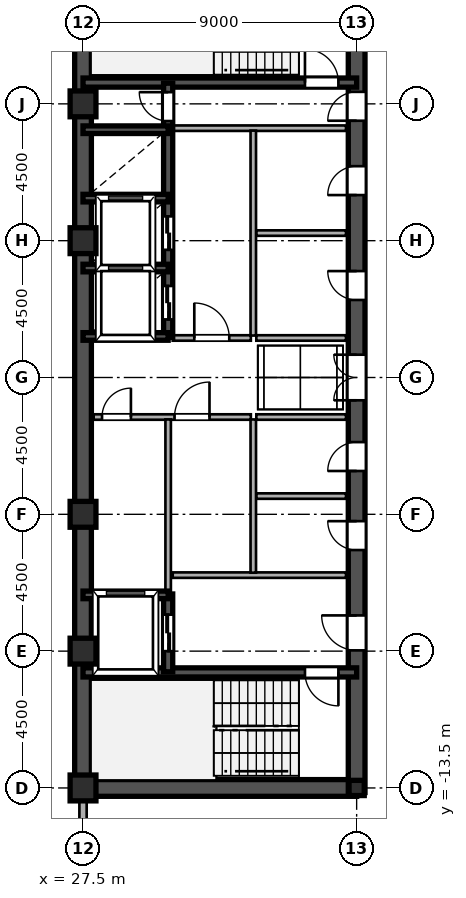
"""IFC4 building model, lengths in metres.
Left out: names, types, materials, properties, quantities, classifications, styles, units other than length and angle.
Written with IfcOpenShell. Run it as: python <this file> out.ifc"""

import sys

from ifc_helpers import new_model, si_unit, direction, frame, frame_2d, origin, origin_2d, place, context, subcontext, project, spatial, rectangle, hollow_rectangle, i_section, extrude, source, transform, mapped, element, fill, save


model = new_model("IFC4")
c1 = context("Model", 3, precision=1e-05, world=origin(), true_north=direction((0.0, 1.0)))
c2 = subcontext(c1, "Body", "Model", "MODEL_VIEW")
j1 = project(units=[si_unit("LENGTHUNIT", "METRE"), si_unit("PLANEANGLEUNIT", "RADIAN")], contexts=[c1])
p1 = place(None, origin())
s1 = spatial("IfcSite", under=j1, at=p1, CompositionType="ELEMENT")
p2 = place(p1, origin())
s2 = spatial("IfcBuilding", under=s1, at=p2, CompositionType="ELEMENT")
p3 = place(p2, frame((0.0, 0.0, 206.7)))
s3 = spatial("IfcBuildingStorey", under=s2, at=p3, CompositionType="ELEMENT", Elevation=206.7)
m1 = source(origin(), c2, "Body", "SweptSolid", [
    extrude(hollow_rectangle(XDim=0.85, YDim=0.85, WallThickness=0.036, at=origin_2d()), origin(), (0.0, 0.0, 1.0), 3.6),
])
for number, where, z_axis, x_axis in (
    (1, (27.5, -13.5, 0.0), (0.0, 0.0, 1.0), (1.0, 0.0, 0.0)),
    (2, (27.5, -9.0, 0.0), (0.0, 0.0, 1.0), (1.0, 0.0, 0.0)),
    (3, (27.5, -4.5, 0.0), (0.0, 0.0, 1.0), (1.0, 0.0, 0.0)),
    (4, (27.5, 4.5, 0.0), (0.0, 0.0, 1.0), (1.0, 0.0, 0.0)),
    (5, (27.5, 9.0, 0.0), (0.0, 0.0, 1.0), (1.0, 0.0, 0.0)),
):
    element("IfcColumn", number, at=place(p3, frame(where, z_axis=z_axis, x_axis=x_axis)), inside=s3, PredefinedType="COLUMN", context=c2, shape_type="MappedRepresentation", body=[
        mapped(m1, transform((0.0, 0.0, 0.0), scale=1.0)),
    ])
m2 = source(origin(), c2, "Body", "SweptSolid", [
    extrude(i_section(OverallWidth=0.5, OverallDepth=0.5, WebThickness=0.02, FlangeThickness=0.032, at=origin_2d()), origin(), (0.0, 0.0, 1.0), 3.6),
])
p4 = place(p3, frame((36.5, -13.5, 0.0), z_axis=(0.0, 0.0, 1.0), x_axis=(1.0, 0.0, 0.0)))
e6 = element("IfcColumn", 6, at=p4, inside=s3, PredefinedType="COLUMN", context=c2, shape_type="MappedRepresentation", body=[
    mapped(m2, transform((0.0, 0.0, 0.0), scale=1.0)),
])
p5 = place(p3, frame((27.5, -15.98, 0.0), z_axis=(0.0, 0.0, 1.0), x_axis=(0.0, 1.0, 0.0)))
e7 = element("IfcWall", 7, at=p5, inside=s3, PredefinedType="SOLIDWALL", context=c2, shape_type="SweptSolid", body=[
    extrude(rectangle(XDim=1.6, YDim=0.24, at=frame_2d((0.8, 0.0))), origin(), (0.0, 0.0, 1.0), 3.38),
])
p6 = place(p3, frame((27.5, -14.38, 0.0), z_axis=(0.0, 0.0, 1.0), x_axis=(0.0, 1.0, 0.0)))
e8 = element("IfcWall", 8, at=p6, inside=s3, PredefinedType="SOLIDWALL", context=c2, shape_type="SweptSolid", body=[
    extrude(rectangle(XDim=0.6, YDim=0.24, at=frame_2d((0.3, 0.0))), origin(), (0.0, 0.0, 1.0), 2.88),
])
for number, where, z_axis, x_axis in (
    (9, (27.5, -13.5, 0.0), (0.0, 0.0, 1.0), (0.0, 1.0, 0.0)),
    (10, (27.5, 1.3, 0.0), (0.0, 0.0, 1.0), (0.0, 1.0, 0.0)),
):
    element("IfcWall", number, at=place(p3, frame(where, z_axis=z_axis, x_axis=x_axis)), inside=s3, PredefinedType="SHEAR", context=c2, shape_type="SweptSolid", body=[
        extrude(rectangle(XDim=12.2, YDim=0.55, at=frame_2d((6.1, 0.0))), origin(), (0.0, 0.0, 1.0), 3.38),
    ])
p7 = place(p3, frame((27.5, -1.3, 0.0), z_axis=(0.0, 0.0, 1.0), x_axis=(0.0, 1.0, 0.0)))
e11 = element("IfcWall", 11, at=p7, inside=s3, PredefinedType="SHEAR", context=c2, shape_type="SweptSolid", body=[
    extrude(rectangle(XDim=2.6, YDim=0.55, at=frame_2d((1.3, 0.0))), origin(), (0.0, 0.0, 1.0), 3.38),
])
p8 = place(p3, frame((27.5, -13.5, 0.0), z_axis=(0.0, 0.0, 1.0), x_axis=(1.0, 0.0, 0.0)))
e12 = element("IfcWall", 12, at=p8, inside=s3, PredefinedType="SHEAR", context=c2, shape_type="SweptSolid", body=[
    extrude(rectangle(XDim=9.0, YDim=0.55, at=frame_2d((4.5, 0.0))), origin(), (0.0, 0.0, 1.0), 3.38),
])
p9 = place(p3, frame((36.5, -13.65, 0.0), z_axis=(0.0, 0.0, 1.0), x_axis=(0.0, 1.0, 0.0)))
e13 = element("IfcWall", 13, at=p9, inside=s3, PredefinedType="SHEAR", context=c2, shape_type="SweptSolid", body=[
    extrude(rectangle(XDim=7.15, YDim=0.55, at=frame_2d((3.575, 0.0))), origin(), (0.0, 0.0, 1.0), 3.38),
])
p10 = place(p9, frame((4.675, 0.0, 0.0)))
e14 = element("IfcOpeningElement", 14, at=p10, cuts=e13, PredefinedType="OPENING", context=c2, shape_type="SweptSolid", body=[
    extrude(rectangle(XDim=1.15, YDim=2.2, at=frame_2d((0.575, 1.1))), frame((0.0, 0.285, 0.0), z_axis=(0.0, -1.0, 0.0), x_axis=(1.0, 0.0, 0.0)), (0.0, 0.0, 1.0), 0.57),
])
p11 = place(p3, frame((36.5, -1.3, 0.0), z_axis=(0.0, 0.0, 1.0), x_axis=(0.0, 1.0, 0.0)))
e15 = element("IfcWall", 15, at=p11, inside=s3, PredefinedType="SHEAR", context=c2, shape_type="SweptSolid", body=[
    extrude(rectangle(XDim=2.6, YDim=0.55, at=frame_2d((1.3, 0.0))), origin(), (0.0, 0.0, 1.0), 3.38),
])
p12 = place(p11, frame((0.55, 0.0, 0.0)))
e16 = element("IfcOpeningElement", 16, at=p12, cuts=e15, PredefinedType="OPENING", context=c2, shape_type="SweptSolid", body=[
    extrude(rectangle(XDim=1.5, YDim=2.3, at=frame_2d((0.75, 1.15))), frame((0.0, 0.285, 0.0), z_axis=(0.0, -1.0, 0.0), x_axis=(1.0, 0.0, 0.0)), (0.0, 0.0, 1.0), 0.57),
])
p13 = place(p3, frame((36.5, 8.2, 0.0), z_axis=(0.0, 0.0, 1.0), x_axis=(0.0, 1.0, 0.0)))
e17 = element("IfcWall", 17, at=p13, inside=s3, PredefinedType="SHEAR", context=c2, shape_type="SweptSolid", body=[
    extrude(rectangle(XDim=5.45, YDim=0.55, at=frame_2d((2.725, 0.0))), origin(), (0.0, 0.0, 1.0), 3.38),
])
p14 = place(p13, frame((0.245, 0.0, 0.0)))
e18 = element("IfcOpeningElement", 18, at=p14, cuts=e17, PredefinedType="OPENING", context=c2, shape_type="SweptSolid", body=[
    extrude(rectangle(XDim=0.95, YDim=2.15, at=frame_2d((0.475, 1.075))), frame((0.0, 0.285, 0.0), z_axis=(0.0, -1.0, 0.0), x_axis=(1.0, 0.0, 0.0)), (0.0, 0.0, 1.0), 0.57),
])
p15 = place(p3, frame((36.5, -6.5, 0.0), z_axis=(0.0, 0.0, 1.0), x_axis=(0.0, 1.0, 0.0)))
e19 = element("IfcWall", 19, at=p15, inside=s3, PredefinedType="SHEAR", context=c2, shape_type="SweptSolid", body=[
    extrude(rectangle(XDim=2.6, YDim=0.55, at=frame_2d((1.3, 0.0))), origin(), (0.0, 0.0, 1.0), 3.38),
])
p16 = place(p15, frame((0.825, 0.0, 0.0)))
e20 = element("IfcOpeningElement", 20, at=p16, cuts=e19, PredefinedType="OPENING", context=c2, shape_type="SweptSolid", body=[
    extrude(rectangle(XDim=0.95, YDim=2.15, at=frame_2d((0.475, 1.075))), frame((0.0, 0.285, 0.0), z_axis=(0.0, -1.0, 0.0), x_axis=(1.0, 0.0, 0.0)), (0.0, 0.0, 1.0), 0.57),
])
p17 = place(p3, frame((36.5, -3.9, 0.0), z_axis=(0.0, 0.0, 1.0), x_axis=(0.0, 1.0, 0.0)))
e21 = element("IfcWall", 21, at=p17, inside=s3, PredefinedType="SHEAR", context=c2, shape_type="SweptSolid", body=[
    extrude(rectangle(XDim=2.6, YDim=0.55, at=frame_2d((1.3, 0.0))), origin(), (0.0, 0.0, 1.0), 3.38),
])
p18 = place(p17, frame((0.825, 0.0, 0.0)))
e22 = element("IfcOpeningElement", 22, at=p18, cuts=e21, PredefinedType="OPENING", context=c2, shape_type="SweptSolid", body=[
    extrude(rectangle(XDim=0.95, YDim=2.15, at=frame_2d((0.475, 1.075))), frame((0.0, 0.285, 0.0), z_axis=(0.0, -1.0, 0.0), x_axis=(1.0, 0.0, 0.0)), (0.0, 0.0, 1.0), 0.57),
])
p19 = place(p3, frame((36.5, 1.3, 0.0), z_axis=(0.0, 0.0, 1.0), x_axis=(0.0, 1.0, 0.0)))
e23 = element("IfcWall", 23, at=p19, inside=s3, PredefinedType="SHEAR", context=c2, shape_type="SweptSolid", body=[
    extrude(rectangle(XDim=3.45, YDim=0.55, at=frame_2d((1.725, 0.0))), origin(), (0.0, 0.0, 1.0), 3.38),
])
p20 = place(p19, frame((1.25, 0.0, 0.0)))
e24 = element("IfcOpeningElement", 24, at=p20, cuts=e23, PredefinedType="OPENING", context=c2, shape_type="SweptSolid", body=[
    extrude(rectangle(XDim=0.95, YDim=2.15, at=frame_2d((0.475, 1.075))), frame((0.0, 0.285, 0.0), z_axis=(0.0, -1.0, 0.0), x_axis=(1.0, 0.0, 0.0)), (0.0, 0.0, 1.0), 0.57),
])
p21 = place(p3, frame((36.5, 4.75, 0.0), z_axis=(0.0, 0.0, 1.0), x_axis=(0.0, 1.0, 0.0)))
e25 = element("IfcWall", 25, at=p21, inside=s3, PredefinedType="SHEAR", context=c2, shape_type="SweptSolid", body=[
    extrude(rectangle(XDim=3.45, YDim=0.55, at=frame_2d((1.725, 0.0))), origin(), (0.0, 0.0, 1.0), 3.38),
])
p22 = place(p21, frame((1.25, 0.0, 0.0)))
e26 = element("IfcOpeningElement", 26, at=p22, cuts=e25, PredefinedType="OPENING", context=c2, shape_type="SweptSolid", body=[
    extrude(rectangle(XDim=0.95, YDim=2.15, at=frame_2d((0.475, 1.075))), frame((0.0, 0.285, 0.0), z_axis=(0.0, -1.0, 0.0), x_axis=(1.0, 0.0, 0.0)), (0.0, 0.0, 1.0), 0.57),
])
p23 = place(p3, frame((27.5, -9.7, 0.0), z_axis=(0.0, 0.0, 1.0), x_axis=(1.0, 0.0, 0.0)))
e27 = element("IfcWall", 27, at=p23, inside=s3, PredefinedType="SHEAR", context=c2, shape_type="SweptSolid", body=[
    extrude(rectangle(XDim=9.0, YDim=0.3, at=frame_2d((4.5, 0.0))), origin(), (0.0, 0.0, 1.0), 3.38),
])
p24 = place(p23, frame((7.3, 0.0, 0.0)))
e28 = element("IfcOpeningElement", 28, at=p24, cuts=e27, PredefinedType="OPENING", context=c2, shape_type="SweptSolid", body=[
    extrude(rectangle(XDim=1.1, YDim=2.2, at=frame_2d((0.55, 1.1))), frame((0.0, 0.16, 0.0), z_axis=(0.0, -1.0, 0.0), x_axis=(1.0, 0.0, 0.0)), (0.0, 0.0, 1.0), 0.32),
])
p25 = place(p3, frame((27.5, 9.7, 0.0), z_axis=(0.0, 0.0, 1.0), x_axis=(1.0, 0.0, 0.0)))
e29 = element("IfcWall", 29, at=p25, inside=s3, PredefinedType="SHEAR", context=c2, shape_type="SweptSolid", body=[
    extrude(rectangle(XDim=9.0, YDim=0.3, at=frame_2d((4.5, 0.0))), origin(), (0.0, 0.0, 1.0), 3.38),
])
p26 = place(p25, frame((7.3, 0.0, 0.0)))
e30 = element("IfcOpeningElement", 30, at=p26, cuts=e29, PredefinedType="OPENING", context=c2, shape_type="SweptSolid", body=[
    extrude(rectangle(XDim=1.1, YDim=2.2, at=frame_2d((0.55, 1.1))), frame((0.0, 0.16, 0.0), z_axis=(0.0, -1.0, 0.0), x_axis=(1.0, 0.0, 0.0)), (0.0, 0.0, 1.0), 0.32),
])
for number, where, z_axis, x_axis in (
    (31, (27.5, -7.15, 0.0), (0.0, 0.0, 1.0), (1.0, 0.0, 0.0)),
    (32, (27.5, 1.35, 0.0), (0.0, 0.0, 1.0), (1.0, 0.0, 0.0)),
    (33, (27.5, 3.6, 0.0), (0.0, 0.0, 1.0), (1.0, 0.0, 0.0)),
    (34, (27.5, 5.9, 0.0), (0.0, 0.0, 1.0), (1.0, 0.0, 0.0)),
    (35, (27.5, 8.15, 0.0), (0.0, 0.0, 1.0), (1.0, 0.0, 0.0)),
):
    element("IfcWall", number, at=place(p3, frame(where, z_axis=z_axis, x_axis=x_axis)), inside=s3, PredefinedType="SHEAR", context=c2, shape_type="SweptSolid", body=[
        extrude(rectangle(XDim=2.8, YDim=0.25, at=frame_2d((1.4, 0.0))), origin(), (0.0, 0.0, 1.0), 3.38),
    ])
p27 = place(p3, frame((30.3, -9.68, 0.0), z_axis=(0.0, 0.0, 1.0), x_axis=(0.0, 1.0, 0.0)))
e36 = element("IfcWall", 36, at=p27, inside=s3, PredefinedType="SHEAR", context=c2, shape_type="SweptSolid", body=[
    extrude(rectangle(XDim=2.56, YDim=0.3, at=frame_2d((1.28, 0.0))), origin(), (0.0, 0.0, 1.0), 3.38),
])
p28 = place(p27, frame((0.68, 0.0, 0.0)))
e37 = element("IfcOpeningElement", 37, at=p28, cuts=e36, PredefinedType="OPENING", context=c2, shape_type="SweptSolid", body=[
    extrude(rectangle(XDim=1.2, YDim=2.25, at=frame_2d((0.6, 1.125))), frame((0.0, 0.16, 0.0), z_axis=(0.0, -1.0, 0.0), x_axis=(1.0, 0.0, 0.0)), (0.0, 0.0, 1.0), 0.32),
])
p29 = place(p3, frame((30.3, 1.32, 0.0), z_axis=(0.0, 0.0, 1.0), x_axis=(0.0, 1.0, 0.0)))
e38 = element("IfcWall", 38, at=p29, inside=s3, PredefinedType="SHEAR", context=c2, shape_type="SweptSolid", body=[
    extrude(rectangle(XDim=2.28, YDim=0.3, at=frame_2d((1.14, 0.0))), origin(), (0.0, 0.0, 1.0), 3.38),
])
p30 = place(p29, frame((0.59, 0.0, 0.0)))
e39 = element("IfcOpeningElement", 39, at=p30, cuts=e38, PredefinedType="OPENING", context=c2, shape_type="SweptSolid", body=[
    extrude(rectangle(XDim=1.1, YDim=2.2, at=frame_2d((0.55, 1.1))), frame((0.0, 0.16, 0.0), z_axis=(0.0, -1.0, 0.0), x_axis=(1.0, 0.0, 0.0)), (0.0, 0.0, 1.0), 0.32),
])
p31 = place(p3, frame((30.3, 3.6, 0.0), z_axis=(0.0, 0.0, 1.0), x_axis=(0.0, 1.0, 0.0)))
e40 = element("IfcWall", 40, at=p31, inside=s3, PredefinedType="SHEAR", context=c2, shape_type="SweptSolid", body=[
    extrude(rectangle(XDim=2.3, YDim=0.3, at=frame_2d((1.15, 0.0))), origin(), (0.0, 0.0, 1.0), 3.38),
])
p32 = place(p31, frame((0.6, 0.0, 0.0)))
e41 = element("IfcOpeningElement", 41, at=p32, cuts=e40, PredefinedType="OPENING", context=c2, shape_type="SweptSolid", body=[
    extrude(rectangle(XDim=1.1, YDim=2.2, at=frame_2d((0.55, 1.1))), frame((0.0, 0.16, 0.0), z_axis=(0.0, -1.0, 0.0), x_axis=(1.0, 0.0, 0.0)), (0.0, 0.0, 1.0), 0.32),
])
p33 = place(p3, frame((30.3, 5.9, 0.0), z_axis=(0.0, 0.0, 1.0), x_axis=(0.0, 1.0, 0.0)))
e42 = element("IfcWall", 42, at=p33, inside=s3, PredefinedType="SHEAR", context=c2, shape_type="SweptSolid", body=[
    extrude(rectangle(XDim=2.25, YDim=0.3, at=frame_2d((1.125, 0.0))), origin(), (0.0, 0.0, 1.0), 3.38),
])
p34 = place(p3, frame((30.3, 8.15, 0.0), z_axis=(0.0, 0.0, 1.0), x_axis=(0.0, 1.0, 0.0)))
e43 = element("IfcWall", 43, at=p34, inside=s3, PredefinedType="SHEAR", context=c2, shape_type="SweptSolid", body=[
    extrude(rectangle(XDim=1.53, YDim=0.3, at=frame_2d((0.765, 0.0))), origin(), (0.0, 0.0, 1.0), 3.38),
])
p35 = place(p34, frame((0.285, 0.0, 0.0)))
e44 = element("IfcOpeningElement", 44, at=p35, cuts=e43, PredefinedType="OPENING", context=c2, shape_type="SweptSolid", body=[
    extrude(rectangle(XDim=0.95, YDim=2.15, at=frame_2d((0.475, 1.075))), frame((0.0, 0.16, 0.0), z_axis=(0.0, -1.0, 0.0), x_axis=(1.0, 0.0, 0.0)), (0.0, 0.0, 1.0), 0.32),
])
for number, where, z_axis, x_axis in (
    (45, (30.45, -6.5, 0.0), (0.0, 0.0, 1.0), (1.0, 0.0, 0.0)),
    (46, (30.45, 8.2, 0.0), (0.0, 0.0, 1.0), (1.0, 0.0, 0.0)),
):
    element("IfcWall", number, at=place(p3, frame(where, z_axis=z_axis, x_axis=x_axis)), inside=s3, PredefinedType="PARTITIONING", context=c2, shape_type="SweptSolid", body=[
        extrude(rectangle(XDim=5.7, YDim=0.18, at=frame_2d((2.85, 0.0))), origin(), (0.0, 0.0, 1.0), 3.38),
    ])
p36 = place(p3, frame((33.1, -6.42, 0.0), z_axis=(0.0, 0.0, 1.0), x_axis=(0.0, 1.0, 0.0)))
e47 = element("IfcWall", 47, at=p36, inside=s3, PredefinedType="PARTITIONING", context=c2, shape_type="SweptSolid", body=[
    extrude(rectangle(XDim=5.04, YDim=0.18, at=frame_2d((2.52, 0.0))), origin(), (0.0, 0.0, 1.0), 3.38),
])
p37 = place(p3, frame((33.1, 1.38, 0.0), z_axis=(0.0, 0.0, 1.0), x_axis=(0.0, 1.0, 0.0)))
e48 = element("IfcWall", 48, at=p37, inside=s3, PredefinedType="PARTITIONING", context=c2, shape_type="SweptSolid", body=[
    extrude(rectangle(XDim=6.74, YDim=0.18, at=frame_2d((3.37, 0.0))), origin(), (0.0, 0.0, 1.0), 3.38),
])
p38 = place(p3, frame((27.85, -1.3, 0.0), z_axis=(0.0, 0.0, 1.0), x_axis=(1.0, 0.0, 0.0)))
e49 = element("IfcWall", 49, at=p38, inside=s3, PredefinedType="PARTITIONING", context=c2, shape_type="SweptSolid", body=[
    extrude(rectangle(XDim=2.45, YDim=0.18, at=frame_2d((1.225, 0.0))), origin(), (0.0, 0.0, 1.0), 3.38),
])
p39 = place(p38, frame((0.275, 0.0, 0.0)))
e50 = element("IfcOpeningElement", 50, at=p39, cuts=e49, PredefinedType="OPENING", context=c2, shape_type="SweptSolid", body=[
    extrude(rectangle(XDim=0.95, YDim=2.15, at=frame_2d((0.475, 1.075))), frame((0.0, 0.1, 0.0), z_axis=(0.0, -1.0, 0.0), x_axis=(1.0, 0.0, 0.0)), (0.0, 0.0, 1.0), 0.2),
])
p40 = place(p3, frame((30.3, -1.3, 0.0), z_axis=(0.0, 0.0, 1.0), x_axis=(1.0, 0.0, 0.0)))
e51 = element("IfcWall", 51, at=p40, inside=s3, PredefinedType="PARTITIONING", context=c2, shape_type="SweptSolid", body=[
    extrude(rectangle(XDim=2.72, YDim=0.18, at=frame_2d((1.36, 0.0))), origin(), (0.0, 0.0, 1.0), 3.38),
])
p41 = place(p40, frame((0.21, 0.0, 0.0)))
e52 = element("IfcOpeningElement", 52, at=p41, cuts=e51, PredefinedType="OPENING", context=c2, shape_type="SweptSolid", body=[
    extrude(rectangle(XDim=1.15, YDim=2.2, at=frame_2d((0.575, 1.1))), frame((0.0, 0.1, 0.0), z_axis=(0.0, -1.0, 0.0), x_axis=(1.0, 0.0, 0.0)), (0.0, 0.0, 1.0), 0.2),
])
p42 = place(p3, frame((30.3, -7.12, 0.0), z_axis=(0.0, 0.0, 1.0), x_axis=(0.0, 1.0, 0.0)))
e53 = element("IfcWall", 53, at=p42, inside=s3, PredefinedType="PARTITIONING", context=c2, shape_type="SweptSolid", body=[
    extrude(rectangle(XDim=5.74, YDim=0.18, at=frame_2d((2.87, 0.0))), origin(), (0.0, 0.0, 1.0), 3.38),
])
p43 = place(p3, frame((30.45, 1.3, 0.0), z_axis=(0.0, 0.0, 1.0), x_axis=(1.0, 0.0, 0.0)))
e54 = element("IfcWall", 54, at=p43, inside=s3, PredefinedType="PARTITIONING", context=c2, shape_type="SweptSolid", body=[
    extrude(rectangle(XDim=2.57, YDim=0.18, at=frame_2d((1.285, 0.0))), origin(), (0.0, 0.0, 1.0), 3.38),
])
p44 = place(p43, frame((0.71, 0.0, 0.0)))
e55 = element("IfcOpeningElement", 55, at=p44, cuts=e54, PredefinedType="OPENING", context=c2, shape_type="SweptSolid", body=[
    extrude(rectangle(XDim=1.15, YDim=2.2, at=frame_2d((0.575, 1.1))), frame((0.0, 0.1, 0.0), z_axis=(0.0, -1.0, 0.0), x_axis=(1.0, 0.0, 0.0)), (0.0, 0.0, 1.0), 0.2),
])
for number, where, z_axis, x_axis in (
    (56, (33.2, -1.3, 0.0), (0.0, 0.0, 1.0), (1.0, 0.0, 0.0)),
    (57, (33.2, 1.3, 0.0), (0.0, 0.0, 1.0), (1.0, 0.0, 0.0)),
    (58, (33.2, -3.9, 0.0), (0.0, 0.0, 1.0), (1.0, 0.0, 0.0)),
    (59, (33.2, 4.75, 0.0), (0.0, 0.0, 1.0), (1.0, 0.0, 0.0)),
):
    element("IfcWall", number, at=place(p3, frame(where, z_axis=z_axis, x_axis=x_axis)), inside=s3, PredefinedType="PARTITIONING", context=c2, shape_type="SweptSolid", body=[
        extrude(rectangle(XDim=2.95, YDim=0.18, at=frame_2d((1.475, 0.0))), origin(), (0.0, 0.0, 1.0), 3.38),
    ])
m3 = source(origin(), c2, "Body", "SweptSolid", [
    extrude(rectangle(XDim=1.15, YDim=2.2, at=frame_2d((0.575, 1.1))), frame((0.0, 0.025, 0.0), z_axis=(0.0, -1.0, 0.0), x_axis=(1.0, 0.0, 0.0)), (0.0, 0.0, 1.0), 0.05),
])
p45 = place(p10, origin())
e60 = element("IfcDoor", 60, at=p45, inside=s3, OperationType="SINGLE_SWING_RIGHT", PredefinedType="DOOR", context=c2, shape_type="MappedRepresentation", body=[
    mapped(m3, transform((0.0, 0.0, 0.0), scale=1.0)),
])
fill(e14, e60)
m4 = source(origin(), c2, "Body", "SweptSolid", [
    extrude(rectangle(XDim=1.5, YDim=2.3, at=frame_2d((0.75, 1.15))), frame((0.0, 0.025, 0.0), z_axis=(0.0, -1.0, 0.0), x_axis=(1.0, 0.0, 0.0)), (0.0, 0.0, 1.0), 0.05),
])
p46 = place(p12, origin())
e61 = element("IfcDoor", 61, at=p46, inside=s3, OperationType="DOUBLE_SWING_LEFT", PredefinedType="DOOR", context=c2, shape_type="MappedRepresentation", body=[
    mapped(m4, transform((0.0, 0.0, 0.0), scale=1.0)),
])
fill(e16, e61)
m5 = source(origin(), c2, "Body", "SweptSolid", [
    extrude(rectangle(XDim=0.95, YDim=2.15, at=frame_2d((0.475, 1.075))), frame((0.0, 0.025, 0.0), z_axis=(0.0, -1.0, 0.0), x_axis=(1.0, 0.0, 0.0)), (0.0, 0.0, 1.0), 0.05),
])
p47 = place(p14, origin())
e62 = element("IfcDoor", 62, at=p47, inside=s3, OperationType="SINGLE_SWING_LEFT", PredefinedType="DOOR", context=c2, shape_type="MappedRepresentation", body=[
    mapped(m5, transform((0.0, 0.0, 0.0), scale=1.0)),
])
fill(e18, e62)
p48 = place(p16, origin())
e63 = element("IfcDoor", 63, at=p48, inside=s3, OperationType="SINGLE_SWING_RIGHT", PredefinedType="DOOR", context=c2, shape_type="MappedRepresentation", body=[
    mapped(m5, transform((0.0, 0.0, 0.0), scale=1.0)),
])
fill(e20, e63)
p49 = place(p18, origin())
e64 = element("IfcDoor", 64, at=p49, inside=s3, OperationType="SINGLE_SWING_LEFT", PredefinedType="DOOR", context=c2, shape_type="MappedRepresentation", body=[
    mapped(m5, transform((0.0, 0.0, 0.0), scale=1.0)),
])
fill(e22, e64)
p50 = place(p20, origin())
e65 = element("IfcDoor", 65, at=p50, inside=s3, OperationType="SINGLE_SWING_RIGHT", PredefinedType="DOOR", context=c2, shape_type="MappedRepresentation", body=[
    mapped(m5, transform((0.0, 0.0, 0.0), scale=1.0)),
])
fill(e24, e65)
p51 = place(p22, origin())
e66 = element("IfcDoor", 66, at=p51, inside=s3, OperationType="SINGLE_SWING_LEFT", PredefinedType="DOOR", context=c2, shape_type="MappedRepresentation", body=[
    mapped(m5, transform((0.0, 0.0, 0.0), scale=1.0)),
])
fill(e26, e66)
m6 = source(origin(), c2, "Body", "SweptSolid", [
    extrude(rectangle(XDim=1.1, YDim=2.2, at=frame_2d((0.55, 1.1))), frame((0.0, 0.025, 0.0), z_axis=(0.0, -1.0, 0.0), x_axis=(1.0, 0.0, 0.0)), (0.0, 0.0, 1.0), 0.05),
])
p52 = place(p24, frame((1.1, 0.0, 0.0), z_axis=(0.0, 0.0, 1.0), x_axis=(-1.0, 0.0, 0.0)))
e67 = element("IfcDoor", 67, at=p52, inside=s3, OperationType="SINGLE_SWING_RIGHT", PredefinedType="DOOR", context=c2, shape_type="MappedRepresentation", body=[
    mapped(m6, transform((0.0, 0.0, 0.0), scale=1.0)),
])
fill(e28, e67)
p53 = place(p26, origin())
e68 = element("IfcDoor", 68, at=p53, inside=s3, OperationType="SINGLE_SWING_LEFT", PredefinedType="DOOR", context=c2, shape_type="MappedRepresentation", body=[
    mapped(m6, transform((0.0, 0.0, 0.0), scale=1.0)),
])
fill(e30, e68)
m7 = source(origin(), c2, "Body", "SweptSolid", [
    extrude(rectangle(XDim=1.2, YDim=2.25, at=frame_2d((0.6, 1.125))), frame((0.0, 0.025, 0.0), z_axis=(0.0, -1.0, 0.0), x_axis=(1.0, 0.0, 0.0)), (0.0, 0.0, 1.0), 0.05),
])
p54 = place(p28, origin())
e69 = element("IfcDoor", 69, at=p54, inside=s3, OperationType="DOUBLE_DOOR_SLIDING", PredefinedType="DOOR", context=c2, shape_type="MappedRepresentation", body=[
    mapped(m7, transform((0.0, 0.0, 0.0), scale=1.0)),
])
fill(e37, e69)
m8 = source(origin(), c2, "Body", "SweptSolid", [
    extrude(rectangle(XDim=1.1, YDim=2.2, at=frame_2d((0.55, 1.1))), frame((0.0, 0.025, 0.0), z_axis=(0.0, -1.0, 0.0), x_axis=(1.0, 0.0, 0.0)), (0.0, 0.0, 1.0), 0.05),
])
p55 = place(p30, origin())
e70 = element("IfcDoor", 70, at=p55, inside=s3, OperationType="DOUBLE_DOOR_SLIDING", PredefinedType="DOOR", context=c2, shape_type="MappedRepresentation", body=[
    mapped(m8, transform((0.0, 0.0, 0.0), scale=1.0)),
])
fill(e39, e70)
p56 = place(p32, origin())
e71 = element("IfcDoor", 71, at=p56, inside=s3, OperationType="DOUBLE_DOOR_SLIDING", PredefinedType="DOOR", context=c2, shape_type="MappedRepresentation", body=[
    mapped(m8, transform((0.0, 0.0, 0.0), scale=1.0)),
])
fill(e41, e71)
p57 = place(p35, origin())
e72 = element("IfcDoor", 72, at=p57, inside=s3, OperationType="SINGLE_SWING_RIGHT", PredefinedType="DOOR", context=c2, shape_type="MappedRepresentation", body=[
    mapped(m5, transform((0.0, 0.0, 0.0), scale=1.0)),
])
fill(e44, e72)
p58 = place(p39, origin())
e73 = element("IfcDoor", 73, at=p58, inside=s3, OperationType="SINGLE_SWING_RIGHT", PredefinedType="DOOR", context=c2, shape_type="MappedRepresentation", body=[
    mapped(m5, transform((0.0, 0.0, 0.0), scale=1.0)),
])
fill(e50, e73)
p59 = place(p41, origin())
e74 = element("IfcDoor", 74, at=p59, inside=s3, OperationType="SINGLE_SWING_RIGHT", PredefinedType="DOOR", context=c2, shape_type="MappedRepresentation", body=[
    mapped(m3, transform((0.0, 0.0, 0.0), scale=1.0)),
])
fill(e52, e74)
p60 = place(p44, origin())
e75 = element("IfcDoor", 75, at=p60, inside=s3, OperationType="SINGLE_SWING_LEFT", PredefinedType="DOOR", context=c2, shape_type="MappedRepresentation", body=[
    mapped(m3, transform((0.0, 0.0, 0.0), scale=1.0)),
])
fill(e55, e75)
save(model, sys.argv[1])
